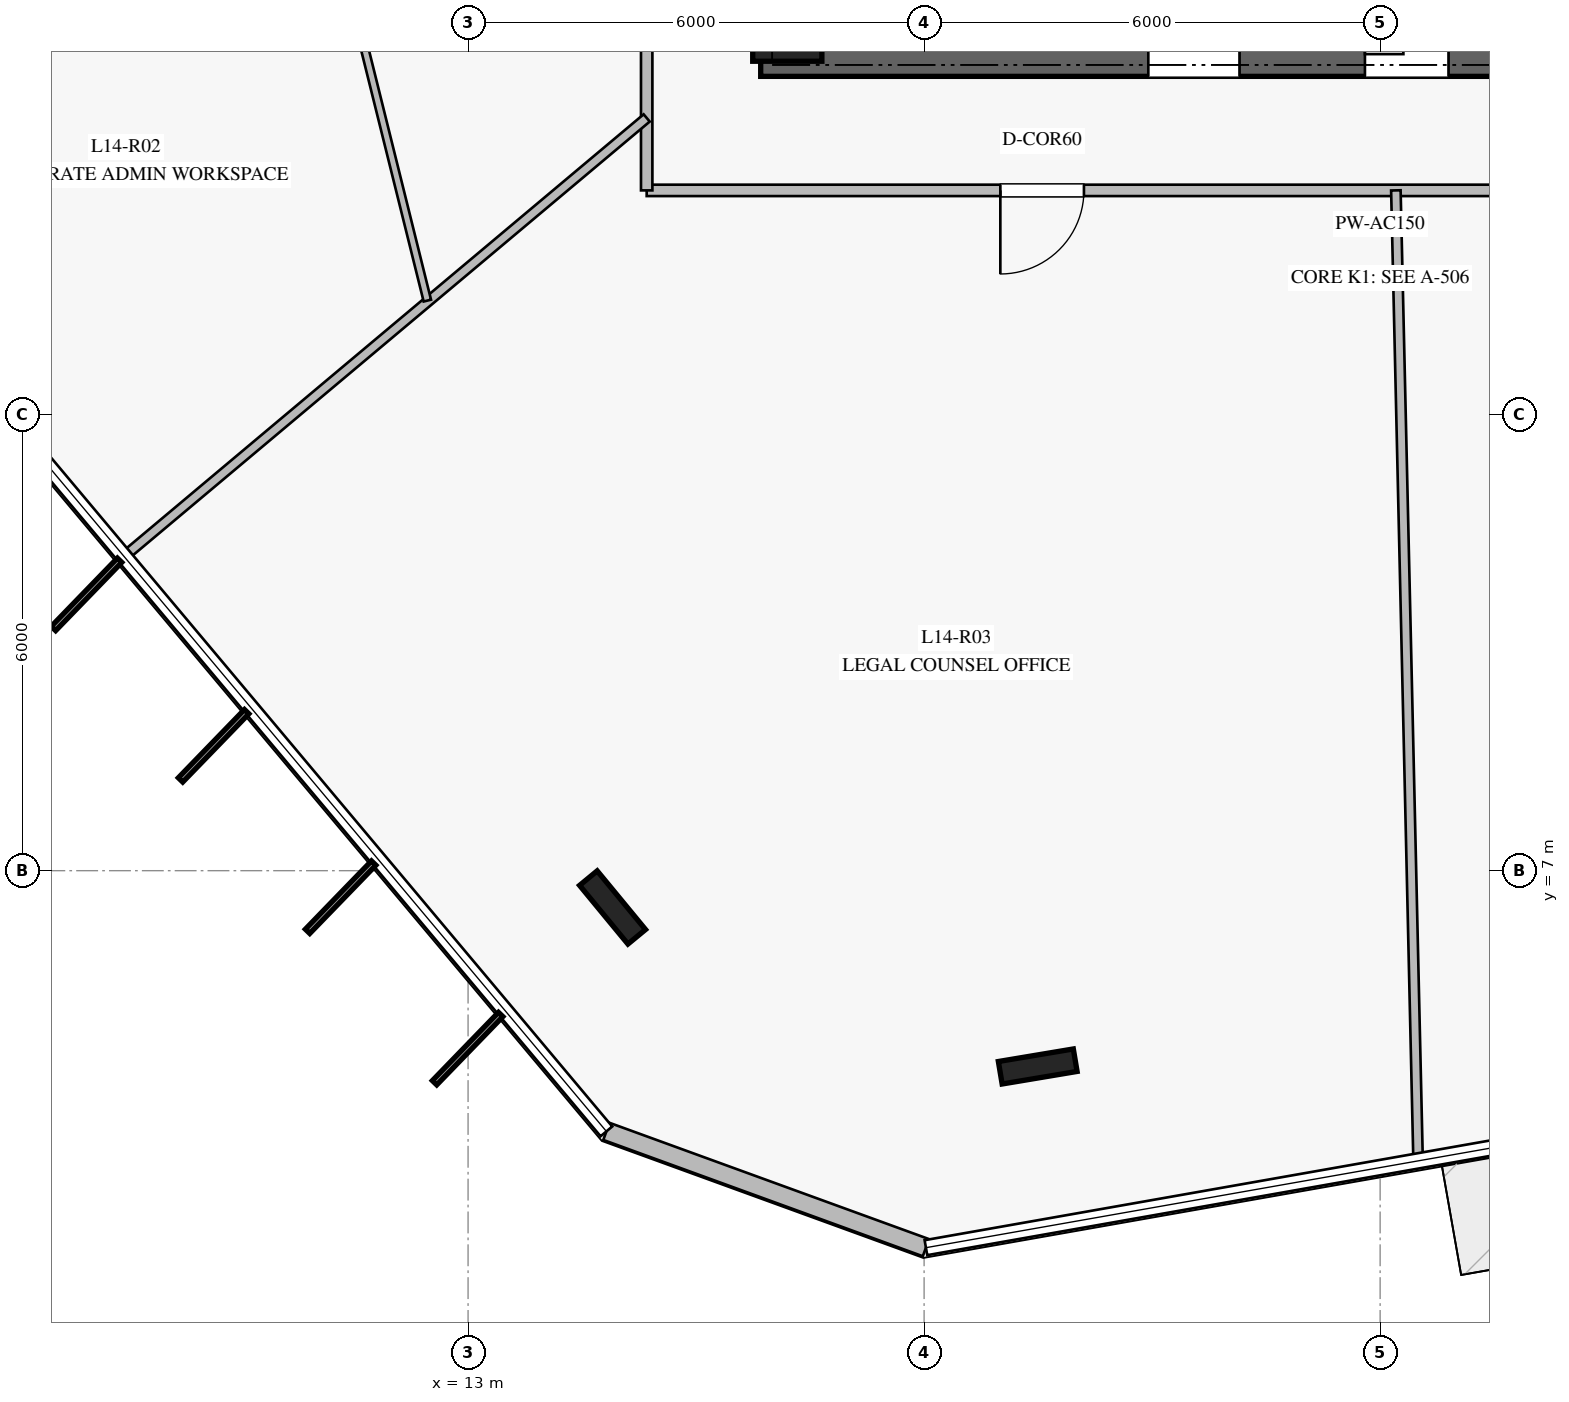
"""IFC4 building model, lengths in metres.
Left out: names, types, materials, properties, quantities, classifications, styles, units other than length and angle.
Written with IfcOpenShell. Run it as: python <this file> out.ifc"""

import sys

from ifc_helpers import new_model, si_unit, direction, frame, frame_2d, origin, origin_2d, place, context, subcontext, project, spatial, rectangle, i_section, extrude, element, fill, save


model = new_model("IFC4")
c1 = context("Model", 3, precision=1e-05, world=origin(), true_north=direction((0.0, 1.0)))
c2 = subcontext(c1, "Body", "Model", "MODEL_VIEW")
j1 = project(units=[si_unit("LENGTHUNIT", "METRE"), si_unit("PLANEANGLEUNIT", "RADIAN")], contexts=[c1])
p1 = place(None, origin())
s1 = spatial("IfcSite", under=j1, at=p1, CompositionType="ELEMENT")
p2 = place(p1, origin())
s2 = spatial("IfcBuilding", under=s1, at=p2, CompositionType="ELEMENT")
p3 = place(p2, frame((0.0, 0.0, 60.0)))
s3 = spatial("IfcBuildingStorey", under=s2, at=p3, CompositionType="ELEMENT", Elevation=60.0)
p4 = place(p3, frame((16.85, 17.8, 0.0), z_axis=(0.0, 0.0, 1.0), x_axis=(1.0, 0.0, 0.0)))
e1 = element("IfcWall", 1, at=p4, inside=s3, PredefinedType="SHEAR", context=c2, shape_type="SweptSolid", body=[
    extrude(rectangle(XDim=16.3, YDim=0.7, at=frame_2d((8.15, 0.0))), origin(), (0.0, 0.0, 1.0), 3.76),
])
p5 = place(p4, frame((5.1, 0.0, 0.0)))
e2 = element("IfcOpeningElement", 2, at=p5, cuts=e1, PredefinedType="OPENING", context=c2, shape_type="SweptSolid", body=[
    extrude(rectangle(XDim=1.2, YDim=2.25, at=frame_2d((0.6, 1.125))), frame((0.0, 0.36, 0.0), z_axis=(0.0, -1.0, 0.0), x_axis=(1.0, 0.0, 0.0)), (0.0, 0.0, 1.0), 0.72),
])
p6 = place(p4, frame((14.05, 0.0, 0.0)))
e3 = element("IfcOpeningElement", 3, at=p6, cuts=e1, PredefinedType="OPENING", context=c2, shape_type="SweptSolid", body=[
    extrude(rectangle(XDim=0.9, YDim=2.1, at=frame_2d((0.45, 1.05))), frame((0.0, 0.36, 0.0), z_axis=(0.0, -1.0, 0.0), x_axis=(1.0, 0.0, 0.0)), (0.0, 0.0, 1.0), 0.72),
])
p7 = place(p4, frame((7.95, 0.0, 0.0)))
e4 = element("IfcOpeningElement", 4, at=p7, cuts=e1, PredefinedType="OPENING", context=c2, shape_type="SweptSolid", body=[
    extrude(rectangle(XDim=1.1, YDim=2.2, at=frame_2d((0.55, 1.1))), frame((0.0, 0.36, 0.0), z_axis=(0.0, -1.0, 0.0), x_axis=(1.0, 0.0, 0.0)), (0.0, 0.0, 1.0), 0.72),
])
p8 = place(p4, frame((9.925, 0.0, 0.0)))
e5 = element("IfcOpeningElement", 5, at=p8, cuts=e1, PredefinedType="OPENING", context=c2, shape_type="SweptSolid", body=[
    extrude(rectangle(XDim=1.1, YDim=2.2, at=frame_2d((0.55, 1.1))), frame((0.0, 0.36, 0.0), z_axis=(0.0, -1.0, 0.0), x_axis=(1.0, 0.0, 0.0)), (0.0, 0.0, 1.0), 0.72),
])
p9 = place(p4, frame((11.9, 0.0, 0.0)))
e6 = element("IfcOpeningElement", 6, at=p9, cuts=e1, PredefinedType="OPENING", context=c2, shape_type="SweptSolid", body=[
    extrude(rectangle(XDim=1.1, YDim=2.2, at=frame_2d((0.55, 1.1))), frame((0.0, 0.36, 0.0), z_axis=(0.0, -1.0, 0.0), x_axis=(1.0, 0.0, 0.0)), (0.0, 0.0, 1.0), 0.72),
])
p10 = place(p3, frame((17.2, 17.8, 0.0), z_axis=(0.0, 0.0, 1.0), x_axis=(1.0, 0.0, 0.0)))
e7 = element("IfcColumn", 7, at=p10, inside=s3, PredefinedType="COLUMN", context=c2, shape_type="SweptSolid", body=[
    extrude(i_section(OverallWidth=0.302, OverallDepth=0.91, WebThickness=0.021, FlangeThickness=0.04, at=origin_2d()), origin(), (0.0, 0.0, 1.0), 4.0),
])
for number, where, z_axis, x_axis in (
    (8, (14.901, 6.516, 0.0), (0.0, 0.0, 1.0), (-0.636, 0.772, 0.0)),
    (9, (20.495, 4.424, 0.0), (0.0, 0.0, 1.0), (0.986, 0.165, 0.0)),
):
    element("IfcColumn", number, at=place(p3, frame(where, z_axis=z_axis, x_axis=x_axis)), inside=s3, PredefinedType="COLUMN", context=c2, shape_type="SweptSolid", body=[
        extrude(i_section(OverallWidth=0.3, OverallDepth=1.0, WebThickness=0.019, FlangeThickness=0.036, at=origin_2d()), origin(), (0.0, 0.0, 1.0), 4.0),
    ])
p11 = place(p3, frame((14.82, 3.57, 0.0), z_axis=(0.0, 0.0, 1.0), x_axis=(0.939696189387, -0.342010338515, 0.0)))
e10 = element("IfcWall", 10, at=p11, inside=s3, PredefinedType="STANDARD", context=c2, shape_type="SweptSolid", body=[
    extrude(rectangle(XDim=4.474, YDim=0.24, at=frame_2d((2.237, 0.0))), origin(), (0.0, 0.0, 1.0), 3.76),
])
p12 = place(p3, frame((34.65, 15.95, 0.0), z_axis=(0.0, 0.0, 1.0), x_axis=(-1.0, 0.0, 0.0)))
e11 = element("IfcWall", 11, at=p12, inside=s3, PredefinedType="PARTITIONING", context=c2, shape_type="SweptSolid", body=[
    extrude(rectangle(XDim=19.3, YDim=0.15, at=frame_2d((9.65, 0.0))), origin(), (0.0, 0.0, 1.0), 3.21),
])
p13 = place(p12, frame((13.547, 0.0, 0.0)))
e12 = element("IfcOpeningElement", 12, at=p13, cuts=e11, PredefinedType="OPENING", context=c2, shape_type="SweptSolid", body=[
    extrude(rectangle(XDim=1.1, YDim=2.2, at=frame_2d((0.55, 1.1))), frame((0.0, 0.085, 0.0), z_axis=(0.0, -1.0, 0.0), x_axis=(1.0, 0.0, 0.0)), (0.0, 0.0, 1.0), 0.17),
])
p14 = place(p3, frame((15.35, 15.95, 0.0), z_axis=(0.0, 0.0, 1.0), x_axis=(0.0, 1.0, 0.0)))
e13 = element("IfcWall", 13, at=p14, inside=s3, PredefinedType="PARTITIONING", context=c2, shape_type="SweptSolid", body=[
    extrude(rectangle(XDim=18.1, YDim=0.15, at=frame_2d((9.05, 0.0))), origin(), (0.0, 0.0, 1.0), 3.21),
])
p15 = place(p14, frame((5.296, 0.0, 0.0)))
e14 = element("IfcOpeningElement", 14, at=p15, cuts=e13, PredefinedType="OPENING", context=c2, shape_type="SweptSolid", body=[
    extrude(rectangle(XDim=1.1, YDim=2.2, at=frame_2d((0.55, 1.1))), frame((0.0, 0.085, 0.0), z_axis=(0.0, -1.0, 0.0), x_axis=(1.0, 0.0, 0.0)), (0.0, 0.0, 1.0), 0.17),
])
p16 = place(p3, frame((15.35, 16.903, 0.0), z_axis=(0.0, 0.0, 1.0), x_axis=(-0.766038717156, -0.642794433562, 0.0)))
e15 = element("IfcWall", 15, at=p16, inside=s3, PredefinedType="PARTITIONING", context=c2, shape_type="SweptSolid", body=[
    extrude(rectangle(XDim=8.958, YDim=0.125, at=frame_2d((4.479, 0.0))), origin(), (0.0, 0.0, 1.0), 3.06),
])
p17 = place(p3, frame((25.207, 15.95, 0.0), z_axis=(0.0, 0.0, 1.0), x_axis=(0.022895344846, -0.999737867235, 0.0)))
e16 = element("IfcWall", 16, at=p17, inside=s3, PredefinedType="PARTITIONING", context=c2, shape_type="SweptSolid", body=[
    extrude(rectangle(XDim=12.753, YDim=0.125, at=frame_2d((6.377, 0.0))), origin(), (0.0, 0.0, 1.0), 3.06),
])
p18 = place(p3, frame((9.063, 28.172, 0.0), z_axis=(0.0, 0.0, 1.0), x_axis=(0.241406037558, -0.970424198498, 0.0)))
e17 = element("IfcWall", 17, at=p18, inside=s3, PredefinedType="MOVABLE", context=c2, shape_type="SweptSolid", body=[
    extrude(rectangle(XDim=14.089, YDim=0.1, at=frame_2d((7.044, 0.0))), origin(), (0.0, 0.0, 1.0), 3.05),
])
p19 = place(p18, frame((6.454, 0.0, 0.0)))
e18 = element("IfcOpeningElement", 18, at=p19, cuts=e17, PredefinedType="OPENING", context=c2, shape_type="SweptSolid", body=[
    extrude(rectangle(XDim=1.0, YDim=2.15, at=frame_2d((0.5, 1.075))), frame((0.0, 0.06, 0.0), z_axis=(0.0, -1.0, 0.0), x_axis=(1.0, 0.0, 0.0)), (0.0, 0.0, 1.0), 0.12),
])
p20 = place(p13, origin())
e19 = element("IfcDoor", 19, at=p20, inside=s3, OperationType="SINGLE_SWING_RIGHT", PredefinedType="DOOR", context=c2, shape_type="SweptSolid", body=[
    extrude(rectangle(XDim=1.1, YDim=2.2, at=frame_2d((0.55, 1.1))), frame((0.0, 0.025, 0.0), z_axis=(0.0, -1.0, 0.0), x_axis=(1.0, 0.0, 0.0)), (0.0, 0.0, 1.0), 0.05),
])
fill(e12, e19)
save(model, sys.argv[1])
